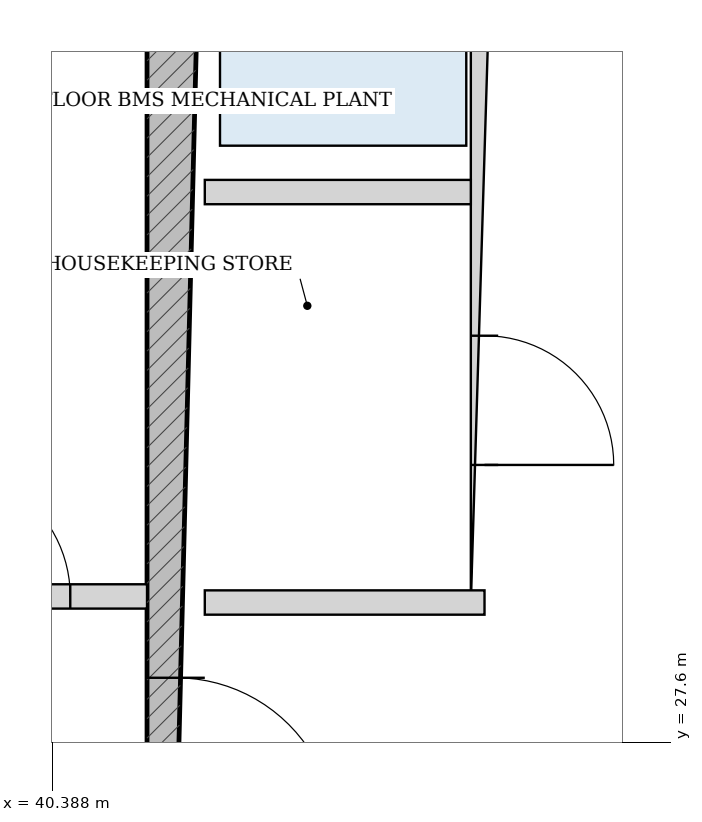
"""IFC4 building model, lengths in metres.
Left out: names, types, materials, properties, quantities, classifications, styles, units other than length and angle.
Written with IfcOpenShell. Run it as: python <this file> out.ifc"""

import sys

from ifc_helpers import new_model, si_unit, direction, frame, frame_2d, origin, place, context, subcontext, project, spatial, rectangle, extrude, source, transform, mapped, element, fill, save


model = new_model("IFC4")
c1 = context("Model", 3, precision=1e-05, world=origin(), true_north=direction((-0.2419218956, 0.970295726276)))
c2 = subcontext(c1, "Body", "Model", "MODEL_VIEW")
j1 = project(units=[si_unit("LENGTHUNIT", "METRE"), si_unit("PLANEANGLEUNIT", "RADIAN")], contexts=[c1])
p1 = place(None, origin())
s1 = spatial("IfcSite", under=j1, at=p1, CompositionType="ELEMENT")
p2 = place(p1, origin())
s2 = spatial("IfcBuilding", under=s1, at=p2, CompositionType="ELEMENT")
p3 = place(p2, frame((0.0, 0.0, 281.95)))
s3 = spatial("IfcBuildingStorey", under=s2, at=p3, CompositionType="ELEMENT", Elevation=281.95)
p4 = place(p3, frame((41.2, 19.175, 0.0), z_axis=(0.0, 0.0, 1.0), x_axis=(0.0, 1.0, 0.0)))
e1 = element("IfcWall", 1, at=p4, inside=s3, PredefinedType="SHEAR", context=c2, shape_type="SweptSolid", body=[
    extrude(rectangle(XDim=15.25, YDim=0.38, at=frame_2d((7.625, 0.0))), origin(), (0.0, 0.0, 1.0), 3.49),
])
p5 = place(p4, frame((7.8, 0.0, 0.0)))
e2 = element("IfcOpeningElement", 2, at=p5, cuts=e1, PredefinedType="OPENING", context=c2, shape_type="SweptSolid", body=[
    extrude(rectangle(XDim=1.05, YDim=2.15, at=frame_2d((0.525, 1.075))), frame((0.0, 0.2, 0.0), z_axis=(0.0, -1.0, 0.0), x_axis=(1.0, 0.0, 0.0)), (0.0, 0.0, 1.0), 0.4),
])
p6 = place(p3, frame((43.23, 28.52, 0.0), z_axis=(0.0, 0.0, 1.0), x_axis=(0.0, 1.0, 0.0)))
e3 = element("IfcWall", 3, at=p6, inside=s3, PredefinedType="PARTITIONING", context=c2, shape_type="SweptSolid", body=[
    extrude(rectangle(XDim=5.905, YDim=0.18, at=frame_2d((2.953, 0.0))), origin(), (0.0, 0.0, 1.0), 3.49),
])
p7 = place(p6, frame((0.905, 0.0, 0.0)))
e4 = element("IfcOpeningElement", 4, at=p7, cuts=e3, PredefinedType="OPENING", context=c2, shape_type="SweptSolid", body=[
    extrude(rectangle(XDim=0.85, YDim=2.1, at=frame_2d((0.425, 1.05))), frame((0.0, 0.1, 0.0), z_axis=(0.0, -1.0, 0.0), x_axis=(1.0, 0.0, 0.0)), (0.0, 0.0, 1.0), 0.2),
])
p8 = place(p6, frame((3.655, 0.0, 0.0)))
e5 = element("IfcOpeningElement", 5, at=p8, cuts=e3, PredefinedType="OPENING", context=c2, shape_type="SweptSolid", body=[
    extrude(rectangle(XDim=1.15, YDim=2.2, at=frame_2d((0.575, 1.1))), frame((0.0, 0.1, 0.0), z_axis=(0.0, -1.0, 0.0), x_axis=(1.0, 0.0, 0.0)), (0.0, 0.0, 1.0), 0.2),
])
p9 = place(p3, frame((41.39, 31.22, 0.0), z_axis=(0.0, 0.0, 1.0), x_axis=(1.0, 0.0, 0.0)))
e6 = element("IfcWall", 6, at=p9, inside=s3, PredefinedType="PARTITIONING", context=c2, shape_type="SweptSolid", body=[
    extrude(rectangle(XDim=1.75, YDim=0.16, at=frame_2d((0.875, 0.0))), origin(), (0.0, 0.0, 1.0), 3.49),
])
p10 = place(p3, frame((41.39, 28.52, 0.0), z_axis=(0.0, 0.0, 1.0), x_axis=(1.0, 0.0, 0.0)))
e7 = element("IfcWall", 7, at=p10, inside=s3, PredefinedType="PARTITIONING", context=c2, shape_type="SweptSolid", body=[
    extrude(rectangle(XDim=1.84, YDim=0.16, at=frame_2d((0.92, 0.0))), origin(), (0.0, 0.0, 1.0), 3.49),
])
p11 = place(p3, frame((34.99, 28.56, 0.0), z_axis=(0.0, 0.0, 1.0), x_axis=(1.0, 0.0, 0.0)))
e8 = element("IfcWall", 8, at=p11, inside=s3, PredefinedType="PARTITIONING", context=c2, shape_type="SweptSolid", body=[
    extrude(rectangle(XDim=6.02, YDim=0.16, at=frame_2d((3.01, 0.0))), origin(), (0.0, 0.0, 1.0), 3.49),
])
p12 = place(p11, frame((0.505, 0.0, 0.0)))
e9 = element("IfcOpeningElement", 9, at=p12, cuts=e8, PredefinedType="OPENING", context=c2, shape_type="SweptSolid", body=[
    extrude(rectangle(XDim=0.85, YDim=2.1, at=frame_2d((0.425, 1.05))), frame((0.0, 0.09, 0.0), z_axis=(0.0, -1.0, 0.0), x_axis=(1.0, 0.0, 0.0)), (0.0, 0.0, 1.0), 0.18),
])
p13 = place(p11, frame((2.58, 0.0, 0.0)))
e10 = element("IfcOpeningElement", 10, at=p13, cuts=e8, PredefinedType="OPENING", context=c2, shape_type="SweptSolid", body=[
    extrude(rectangle(XDim=0.86, YDim=2.1, at=frame_2d((0.43, 1.05))), frame((0.0, 0.09, 0.0), z_axis=(0.0, -1.0, 0.0), x_axis=(1.0, 0.0, 0.0)), (0.0, 0.0, 1.0), 0.18),
])
p14 = place(p11, frame((4.665, 0.0, 0.0)))
e11 = element("IfcOpeningElement", 11, at=p14, cuts=e8, PredefinedType="OPENING", context=c2, shape_type="SweptSolid", body=[
    extrude(rectangle(XDim=0.85, YDim=2.1, at=frame_2d((0.425, 1.05))), frame((0.0, 0.09, 0.0), z_axis=(0.0, -1.0, 0.0), x_axis=(1.0, 0.0, 0.0)), (0.0, 0.0, 1.0), 0.18),
])
m1 = source(origin(), c2, "Body", "SweptSolid", [
    extrude(rectangle(XDim=1.05, YDim=2.15, at=frame_2d((0.525, 1.075))), frame((0.0, 0.025, 0.0), z_axis=(0.0, -1.0, 0.0), x_axis=(1.0, 0.0, 0.0)), (0.0, 0.0, 1.0), 0.05),
])
p15 = place(p5, frame((1.05, 0.0, 0.0), z_axis=(0.0, 0.0, 1.0), x_axis=(-1.0, 0.0, 0.0)))
e12 = element("IfcDoor", 12, at=p15, inside=s3, OperationType="SINGLE_SWING_RIGHT", PredefinedType="DOOR", context=c2, shape_type="MappedRepresentation", body=[
    mapped(m1, transform((0.0, 0.0, 0.0), scale=1.0)),
])
fill(e2, e12)
m2 = source(origin(), c2, "Body", "SweptSolid", [
    extrude(rectangle(XDim=0.85, YDim=2.1, at=frame_2d((0.425, 1.05))), frame((0.0, 0.025, 0.0), z_axis=(0.0, -1.0, 0.0), x_axis=(1.0, 0.0, 0.0)), (0.0, 0.0, 1.0), 0.05),
])
p16 = place(p7, frame((0.85, 0.0, 0.0), z_axis=(0.0, 0.0, 1.0), x_axis=(-1.0, 0.0, 0.0)))
e13 = element("IfcDoor", 13, at=p16, inside=s3, OperationType="SINGLE_SWING_RIGHT", PredefinedType="DOOR", context=c2, shape_type="MappedRepresentation", body=[
    mapped(m2, transform((0.0, 0.0, 0.0), scale=1.0)),
])
fill(e4, e13)
p17 = place(p14, origin())
e14 = element("IfcDoor", 14, at=p17, inside=s3, OperationType="SINGLE_SWING_LEFT", PredefinedType="DOOR", context=c2, shape_type="MappedRepresentation", body=[
    mapped(m2, transform((0.0, 0.0, 0.0), scale=1.0)),
])
fill(e11, e14)
save(model, sys.argv[1])
